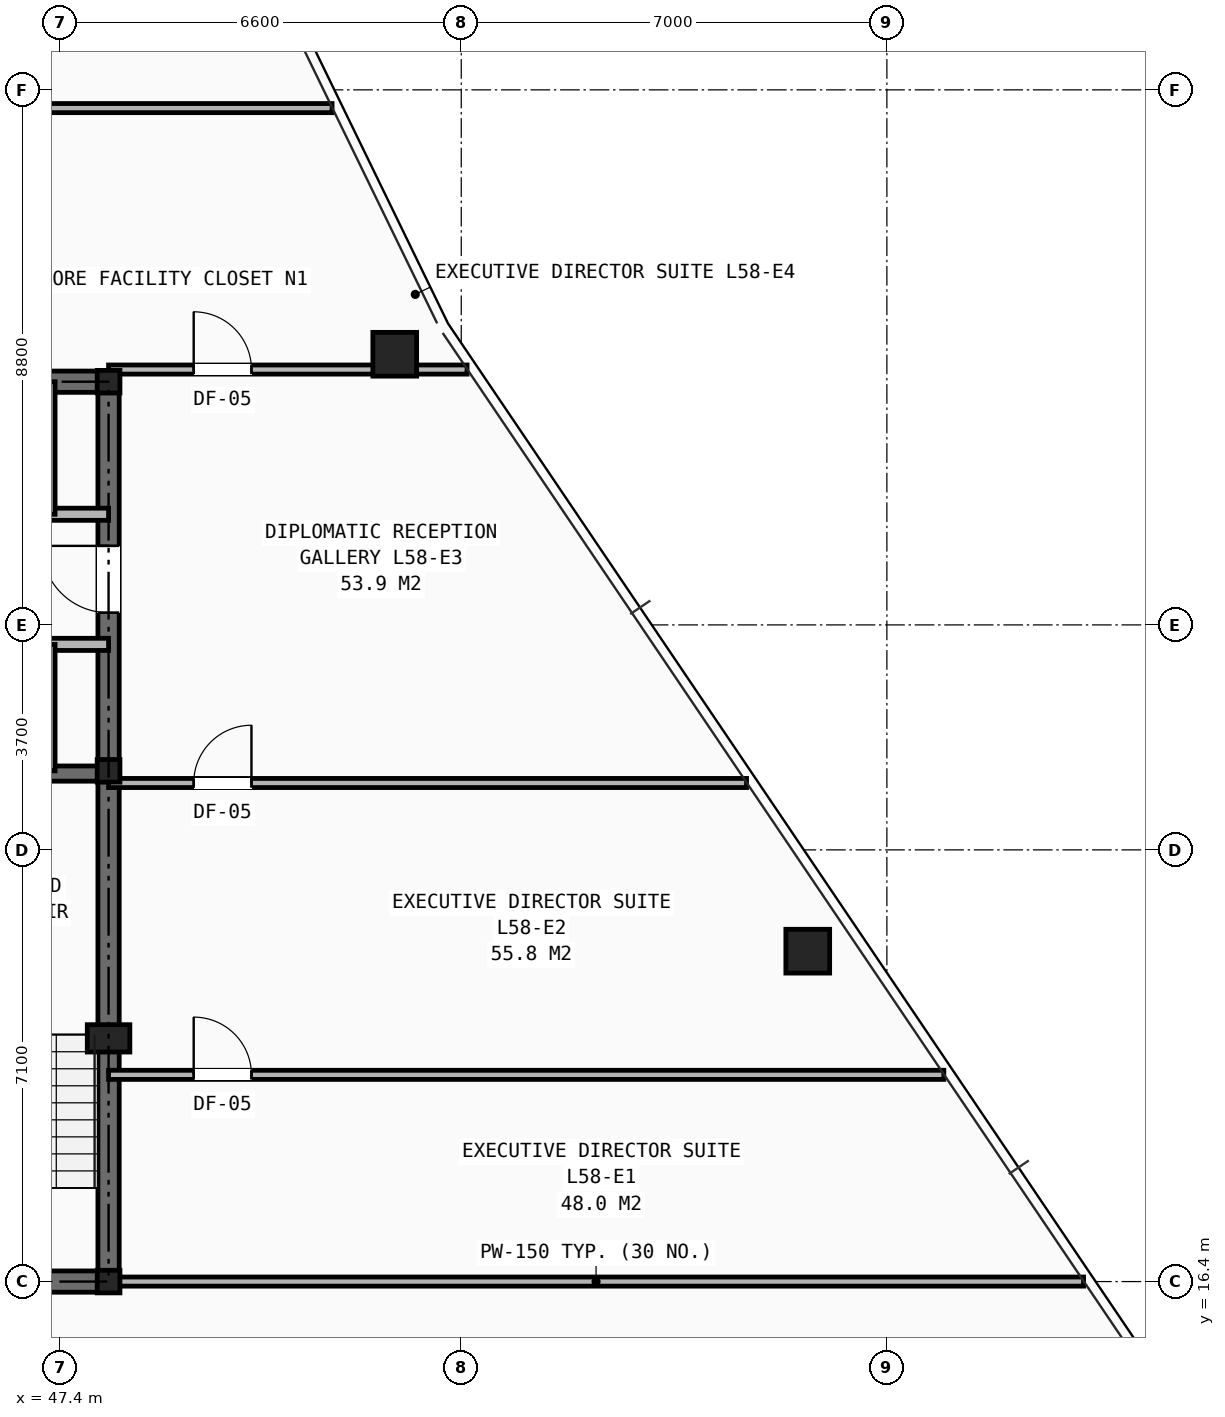
"""IFC4 building model, lengths in metres.
Left out: names, types, materials, properties, quantities, classifications, styles, units other than length and angle.
Written with IfcOpenShell. Run it as: python <this file> out.ifc"""

import sys

from ifc_helpers import new_model, si_unit, direction, frame, frame_2d, origin, origin_2d, place, context, subcontext, project, spatial, rectangle, hollow_rectangle, i_section, extrude, element, fill, save


model = new_model("IFC4")
c1 = context("Model", 3, precision=1e-05, world=origin(), true_north=direction((0.0, 1.0)))
c2 = subcontext(c1, "Body", "Model", "MODEL_VIEW")
j1 = project(units=[si_unit("LENGTHUNIT", "METRE"), si_unit("PLANEANGLEUNIT", "RADIAN")], contexts=[c1])
p1 = place(None, origin())
s1 = spatial("IfcSite", under=j1, at=p1, CompositionType="ELEMENT")
p2 = place(p1, origin())
s2 = spatial("IfcBuilding", under=s1, at=p2, CompositionType="ELEMENT")
p3 = place(p2, frame((0.0, 0.0, 204.9)))
s3 = spatial("IfcBuildingStorey", under=s2, at=p3, CompositionType="ELEMENT", Elevation=204.9)
for number, where, z_axis, x_axis in (
    (1, (48.2, 16.4, 0.0), (0.0, 0.0, 1.0), (1.0, 0.0, 0.0)),
    (2, (48.2, 24.8, 0.0), (0.0, 0.0, 1.0), (1.0, 0.0, 0.0)),
    (3, (48.2, 31.2, 0.0), (0.0, 0.0, 1.0), (1.0, 0.0, 0.0)),
):
    element("IfcColumn", number, at=place(p3, frame(where, z_axis=z_axis, x_axis=x_axis)), inside=s3, PredefinedType="COLUMN", context=c2, shape_type="SweptSolid", body=[
        extrude(i_section(OverallWidth=0.374, OverallDepth=0.372, WebThickness=0.016, FlangeThickness=0.026, at=origin_2d()), origin(), (0.0, 0.0, 1.0), 3.5),
    ])
p4 = place(p3, frame((48.2, 20.4, 0.0), z_axis=(0.0, 0.0, 1.0), x_axis=(1.0, 0.0, 0.0)))
e4 = element("IfcColumn", 4, at=p4, inside=s3, PredefinedType="PILASTER", context=c2, shape_type="SweptSolid", body=[
    extrude(rectangle(XDim=0.7, YDim=0.45, at=origin_2d()), origin(), (0.0, 0.0, 1.0), 3.5),
])
for number, where, z_axis, x_axis in (
    (5, (59.698, 21.834, 0.0), (0.0, 0.0, 1.0), (1.0, 0.0, 0.0)),
    (6, (52.906, 31.652, 0.0), (0.0, 0.0, 1.0), (1.0, 0.0, 0.0)),
):
    element("IfcColumn", number, at=place(p3, frame(where, z_axis=z_axis, x_axis=x_axis)), inside=s3, PredefinedType="COLUMN", context=c2, shape_type="SweptSolid", body=[
        extrude(hollow_rectangle(XDim=0.72, YDim=0.72, WallThickness=0.05, at=origin_2d()), origin(), (0.0, 0.0, 1.0), 3.5),
    ])
p5 = place(p3, frame((31.8, 16.4, 0.0), z_axis=(0.0, 0.0, 1.0), x_axis=(1.0, 0.0, 0.0)))
e7 = element("IfcWall", 7, at=p5, inside=s3, PredefinedType="SHEAR", context=c2, shape_type="SweptSolid", body=[
    extrude(rectangle(XDim=16.4, YDim=0.35, at=frame_2d((8.2, 0.0))), origin(), (0.0, 0.0, 1.0), 3.25),
])
p6 = place(p5, frame((7.75, 0.0, 0.0)))
e8 = element("IfcOpeningElement", 8, at=p6, cuts=e7, PredefinedType="OPENING", context=c2, shape_type="SweptSolid", body=[
    extrude(rectangle(XDim=0.9, YDim=2.1, at=frame_2d((0.45, 1.05))), frame((0.0, 0.185, 0.0), z_axis=(0.0, -1.0, 0.0), x_axis=(1.0, 0.0, 0.0)), (0.0, 0.0, 1.0), 0.37),
])
p7 = place(p5, frame((4.2, 0.0, 0.0)))
e9 = element("IfcOpeningElement", 9, at=p7, cuts=e7, PredefinedType="OPENING", context=c2, shape_type="SweptSolid", body=[
    extrude(rectangle(XDim=0.95, YDim=2.1, at=frame_2d((0.475, 1.05))), frame((0.0, 0.185, 0.0), z_axis=(0.0, -1.0, 0.0), x_axis=(1.0, 0.0, 0.0)), (0.0, 0.0, 1.0), 0.37),
])
p8 = place(p5, frame((10.6, 0.0, 0.0)))
e10 = element("IfcOpeningElement", 10, at=p8, cuts=e7, PredefinedType="OPENING", context=c2, shape_type="SweptSolid", body=[
    extrude(rectangle(XDim=0.95, YDim=2.1, at=frame_2d((0.475, 1.05))), frame((0.0, 0.185, 0.0), z_axis=(0.0, -1.0, 0.0), x_axis=(1.0, 0.0, 0.0)), (0.0, 0.0, 1.0), 0.37),
])
p9 = place(p3, frame((31.8, 31.2, 0.0), z_axis=(0.0, 0.0, 1.0), x_axis=(1.0, 0.0, 0.0)))
e11 = element("IfcWall", 11, at=p9, inside=s3, PredefinedType="SHEAR", context=c2, shape_type="SweptSolid", body=[
    extrude(rectangle(XDim=16.4, YDim=0.35, at=frame_2d((8.2, 0.0))), origin(), (0.0, 0.0, 1.0), 3.25),
])
p10 = place(p3, frame((48.2, 16.4, 0.0), z_axis=(0.0, 0.0, 1.0), x_axis=(0.0, 1.0, 0.0)))
e12 = element("IfcWall", 12, at=p10, inside=s3, PredefinedType="SHEAR", context=c2, shape_type="SweptSolid", body=[
    extrude(rectangle(XDim=14.8, YDim=0.35, at=frame_2d((7.4, 0.0))), origin(), (0.0, 0.0, 1.0), 3.25),
])
p11 = place(p10, frame((11.0, 0.0, 0.0)))
e13 = element("IfcOpeningElement", 13, at=p11, cuts=e12, PredefinedType="OPENING", context=c2, shape_type="SweptSolid", body=[
    extrude(rectangle(XDim=1.1, YDim=2.15, at=frame_2d((0.55, 1.075))), frame((0.0, 0.185, 0.0), z_axis=(0.0, -1.0, 0.0), x_axis=(1.0, 0.0, 0.0)), (0.0, 0.0, 1.0), 0.37),
])
p12 = place(p3, frame((44.955, 24.755, 0.0), z_axis=(0.0, 0.0, 1.0), x_axis=(1.0, 0.0, 0.0)))
e14 = element("IfcWall", 14, at=p12, inside=s3, PredefinedType="SHEAR", context=c2, shape_type="SweptSolid", body=[
    extrude(rectangle(XDim=3.245, YDim=0.25, at=frame_2d((1.623, 0.0))), origin(), (0.0, 0.0, 1.0), 3.25),
])
p13 = place(p3, frame((33.82, 29.02, 0.0), z_axis=(0.0, 0.0, 1.0), x_axis=(1.0, 0.0, 0.0)))
e15 = element("IfcWall", 15, at=p13, inside=s3, PredefinedType="SOLIDWALL", context=c2, shape_type="SweptSolid", body=[
    extrude(rectangle(XDim=14.38, YDim=0.2, at=frame_2d((7.19, 0.0))), origin(), (0.0, 0.0, 1.0), 2.705),
])
p14 = place(p13, frame((1.78, 0.0, 0.0)))
e16 = element("IfcOpeningElement", 16, at=p14, cuts=e15, PredefinedType="OPENING", context=c2, shape_type="SweptSolid", body=[
    extrude(rectangle(XDim=0.9, YDim=2.1, at=frame_2d((0.45, 1.05))), frame((0.0, 0.11, 0.0), z_axis=(0.0, -1.0, 0.0), x_axis=(1.0, 0.0, 0.0)), (0.0, 0.0, 1.0), 0.22),
])
p15 = place(p13, frame((6.07, 0.0, 0.0)))
e17 = element("IfcOpeningElement", 17, at=p15, cuts=e15, PredefinedType="OPENING", context=c2, shape_type="SweptSolid", body=[
    extrude(rectangle(XDim=0.9, YDim=2.1, at=frame_2d((0.45, 1.05))), frame((0.0, 0.11, 0.0), z_axis=(0.0, -1.0, 0.0), x_axis=(1.0, 0.0, 0.0)), (0.0, 0.0, 1.0), 0.22),
])
p16 = place(p13, frame((9.39, 0.0, 0.0)))
e18 = element("IfcOpeningElement", 18, at=p16, cuts=e15, PredefinedType="OPENING", context=c2, shape_type="SweptSolid", body=[
    extrude(rectangle(XDim=1.1, YDim=2.15, at=frame_2d((0.55, 1.075))), frame((0.0, 0.11, 0.0), z_axis=(0.0, -1.0, 0.0), x_axis=(1.0, 0.0, 0.0)), (0.0, 0.0, 1.0), 0.22),
])
p17 = place(p13, frame((11.71, 0.0, 0.0)))
e19 = element("IfcOpeningElement", 19, at=p17, cuts=e15, PredefinedType="OPENING", context=c2, shape_type="SweptSolid", body=[
    extrude(rectangle(XDim=1.1, YDim=2.15, at=frame_2d((0.55, 1.075))), frame((0.0, 0.11, 0.0), z_axis=(0.0, -1.0, 0.0), x_axis=(1.0, 0.0, 0.0)), (0.0, 0.0, 1.0), 0.22),
])
p18 = place(p3, frame((31.8, 26.88, 0.0), z_axis=(0.0, 0.0, 1.0), x_axis=(1.0, 0.0, 0.0)))
e20 = element("IfcWall", 20, at=p18, inside=s3, PredefinedType="SOLIDWALL", context=c2, shape_type="SweptSolid", body=[
    extrude(rectangle(XDim=16.4, YDim=0.2, at=frame_2d((8.2, 0.0))), origin(), (0.0, 0.0, 1.0), 2.705),
])
p19 = place(p18, frame((0.55, 0.0, 0.0)))
e21 = element("IfcOpeningElement", 21, at=p19, cuts=e20, PredefinedType="OPENING", context=c2, shape_type="SweptSolid", body=[
    extrude(rectangle(XDim=0.85, YDim=2.05, at=frame_2d((0.425, 1.025))), frame((0.0, 0.11, 0.0), z_axis=(0.0, -1.0, 0.0), x_axis=(1.0, 0.0, 0.0)), (0.0, 0.0, 1.0), 0.22),
])
p20 = place(p18, frame((5.94, 0.0, 0.0)))
e22 = element("IfcOpeningElement", 22, at=p20, cuts=e20, PredefinedType="OPENING", context=c2, shape_type="SweptSolid", body=[
    extrude(rectangle(XDim=0.9, YDim=2.1, at=frame_2d((0.45, 1.05))), frame((0.0, 0.11, 0.0), z_axis=(0.0, -1.0, 0.0), x_axis=(1.0, 0.0, 0.0)), (0.0, 0.0, 1.0), 0.22),
])
p21 = place(p18, frame((11.41, 0.0, 0.0)))
e23 = element("IfcOpeningElement", 23, at=p21, cuts=e20, PredefinedType="OPENING", context=c2, shape_type="SweptSolid", body=[
    extrude(rectangle(XDim=1.1, YDim=2.15, at=frame_2d((0.55, 1.075))), frame((0.0, 0.11, 0.0), z_axis=(0.0, -1.0, 0.0), x_axis=(1.0, 0.0, 0.0)), (0.0, 0.0, 1.0), 0.22),
])
p22 = place(p18, frame((13.73, 0.0, 0.0)))
e24 = element("IfcOpeningElement", 24, at=p22, cuts=e20, PredefinedType="OPENING", context=c2, shape_type="SweptSolid", body=[
    extrude(rectangle(XDim=1.1, YDim=2.15, at=frame_2d((0.55, 1.075))), frame((0.0, 0.11, 0.0), z_axis=(0.0, -1.0, 0.0), x_axis=(1.0, 0.0, 0.0)), (0.0, 0.0, 1.0), 0.22),
])
p23 = place(p3, frame((47.24, 29.02, 0.0), z_axis=(0.0, 0.0, 1.0), x_axis=(0.0, 1.0, 0.0)))
e25 = element("IfcWall", 25, at=p23, inside=s3, PredefinedType="SOLIDWALL", context=c2, shape_type="SweptSolid", body=[
    extrude(rectangle(XDim=2.18, YDim=0.16, at=frame_2d((1.09, 0.0))), origin(), (0.0, 0.0, 1.0), 2.705),
])
p24 = place(p3, frame((47.24, 24.8, 0.0), z_axis=(0.0, 0.0, 1.0), x_axis=(0.0, 1.0, 0.0)))
e26 = element("IfcWall", 26, at=p24, inside=s3, PredefinedType="SOLIDWALL", context=c2, shape_type="SweptSolid", body=[
    extrude(rectangle(XDim=2.08, YDim=0.16, at=frame_2d((1.04, 0.0))), origin(), (0.0, 0.0, 1.0), 3.25),
])
p25 = place(p3, frame((48.2, 16.4, 0.0), z_axis=(0.0, 0.0, 1.0), x_axis=(1.0, 0.0, 0.0)))
e27 = element("IfcWall", 27, at=p25, inside=s3, PredefinedType="PARTITIONING", context=c2, shape_type="SweptSolid", body=[
    extrude(rectangle(XDim=16.034, YDim=0.15, at=frame_2d((8.017, 0.0))), origin(), (0.0, 0.0, 1.0), 2.292),
])
p26 = place(p3, frame((46.8, 35.7, 0.0), z_axis=(0.0, 0.0, 1.0), x_axis=(1.0, 0.0, 0.0)))
e28 = element("IfcWall", 28, at=p26, inside=s3, PredefinedType="PARTITIONING", context=c2, shape_type="SweptSolid", body=[
    extrude(rectangle(XDim=5.076, YDim=0.15, at=frame_2d((2.538, 0.0))), origin(), (0.0, 0.0, 1.0), 2.628),
])
p27 = place(p3, frame((48.2, 19.8, 0.0), z_axis=(0.0, 0.0, 1.0), x_axis=(1.0, 0.0, 0.0)))
e29 = element("IfcWall", 29, at=p27, inside=s3, PredefinedType="PARTITIONING", context=c2, shape_type="SweptSolid", body=[
    extrude(rectangle(XDim=13.736, YDim=0.15, at=frame_2d((6.868, 0.0))), origin(), (0.0, 0.0, 1.0), 2.292),
])
p28 = place(p27, frame((1.4, 0.0, 0.0)))
e30 = element("IfcOpeningElement", 30, at=p28, cuts=e29, PredefinedType="OPENING", context=c2, shape_type="SweptSolid", body=[
    extrude(rectangle(XDim=0.95, YDim=2.1, at=frame_2d((0.475, 1.05))), frame((0.0, 0.085, 0.0), z_axis=(0.0, -1.0, 0.0), x_axis=(1.0, 0.0, 0.0)), (0.0, 0.0, 1.0), 0.17),
])
p29 = place(p3, frame((48.2, 24.6, 0.0), z_axis=(0.0, 0.0, 1.0), x_axis=(1.0, 0.0, 0.0)))
e31 = element("IfcWall", 31, at=p29, inside=s3, PredefinedType="PARTITIONING", context=c2, shape_type="SweptSolid", body=[
    extrude(rectangle(XDim=10.492, YDim=0.15, at=frame_2d((5.246, 0.0))), origin(), (0.0, 0.0, 1.0), 2.628),
])
p30 = place(p29, frame((1.4, 0.0, 0.0)))
e32 = element("IfcOpeningElement", 32, at=p30, cuts=e31, PredefinedType="OPENING", context=c2, shape_type="SweptSolid", body=[
    extrude(rectangle(XDim=0.95, YDim=2.1, at=frame_2d((0.475, 1.05))), frame((0.0, 0.085, 0.0), z_axis=(0.0, -1.0, 0.0), x_axis=(1.0, 0.0, 0.0)), (0.0, 0.0, 1.0), 0.17),
])
p31 = place(p3, frame((48.2, 31.4, 0.0), z_axis=(0.0, 0.0, 1.0), x_axis=(1.0, 0.0, 0.0)))
e33 = element("IfcWall", 33, at=p31, inside=s3, PredefinedType="PARTITIONING", context=c2, shape_type="SweptSolid", body=[
    extrude(rectangle(XDim=5.896, YDim=0.15, at=frame_2d((2.948, 0.0))), origin(), (0.0, 0.0, 1.0), 2.292),
])
p32 = place(p31, frame((1.4, 0.0, 0.0)))
e34 = element("IfcOpeningElement", 34, at=p32, cuts=e33, PredefinedType="OPENING", context=c2, shape_type="SweptSolid", body=[
    extrude(rectangle(XDim=0.95, YDim=2.1, at=frame_2d((0.475, 1.05))), frame((0.0, 0.085, 0.0), z_axis=(0.0, -1.0, 0.0), x_axis=(1.0, 0.0, 0.0)), (0.0, 0.0, 1.0), 0.17),
])
p33 = place(p11, origin())
e35 = element("IfcDoor", 35, at=p33, inside=s3, OperationType="SINGLE_SWING_RIGHT", PredefinedType="DOOR", context=c2, shape_type="SweptSolid", body=[
    extrude(rectangle(XDim=1.1, YDim=2.15, at=frame_2d((0.55, 1.075))), frame((0.0, 0.025, 0.0), z_axis=(0.0, -1.0, 0.0), x_axis=(1.0, 0.0, 0.0)), (0.0, 0.0, 1.0), 0.05),
])
fill(e13, e35)
p34 = place(p28, origin())
e36 = element("IfcDoor", 36, at=p34, inside=s3, OperationType="SINGLE_SWING_LEFT", PredefinedType="DOOR", context=c2, shape_type="SweptSolid", body=[
    extrude(rectangle(XDim=0.95, YDim=2.1, at=frame_2d((0.475, 1.05))), frame((0.0, 0.025, 0.0), z_axis=(0.0, -1.0, 0.0), x_axis=(1.0, 0.0, 0.0)), (0.0, 0.0, 1.0), 0.05),
])
fill(e30, e36)
p35 = place(p30, origin())
e37 = element("IfcDoor", 37, at=p35, inside=s3, OperationType="SINGLE_SWING_RIGHT", PredefinedType="DOOR", context=c2, shape_type="SweptSolid", body=[
    extrude(rectangle(XDim=0.95, YDim=2.1, at=frame_2d((0.475, 1.05))), frame((0.0, 0.025, 0.0), z_axis=(0.0, -1.0, 0.0), x_axis=(1.0, 0.0, 0.0)), (0.0, 0.0, 1.0), 0.05),
])
fill(e32, e37)
p36 = place(p32, origin())
e38 = element("IfcDoor", 38, at=p36, inside=s3, OperationType="SINGLE_SWING_LEFT", PredefinedType="DOOR", context=c2, shape_type="SweptSolid", body=[
    extrude(rectangle(XDim=0.95, YDim=2.1, at=frame_2d((0.475, 1.05))), frame((0.0, 0.025, 0.0), z_axis=(0.0, -1.0, 0.0), x_axis=(1.0, 0.0, 0.0)), (0.0, 0.0, 1.0), 0.05),
])
fill(e34, e38)
save(model, sys.argv[1])
